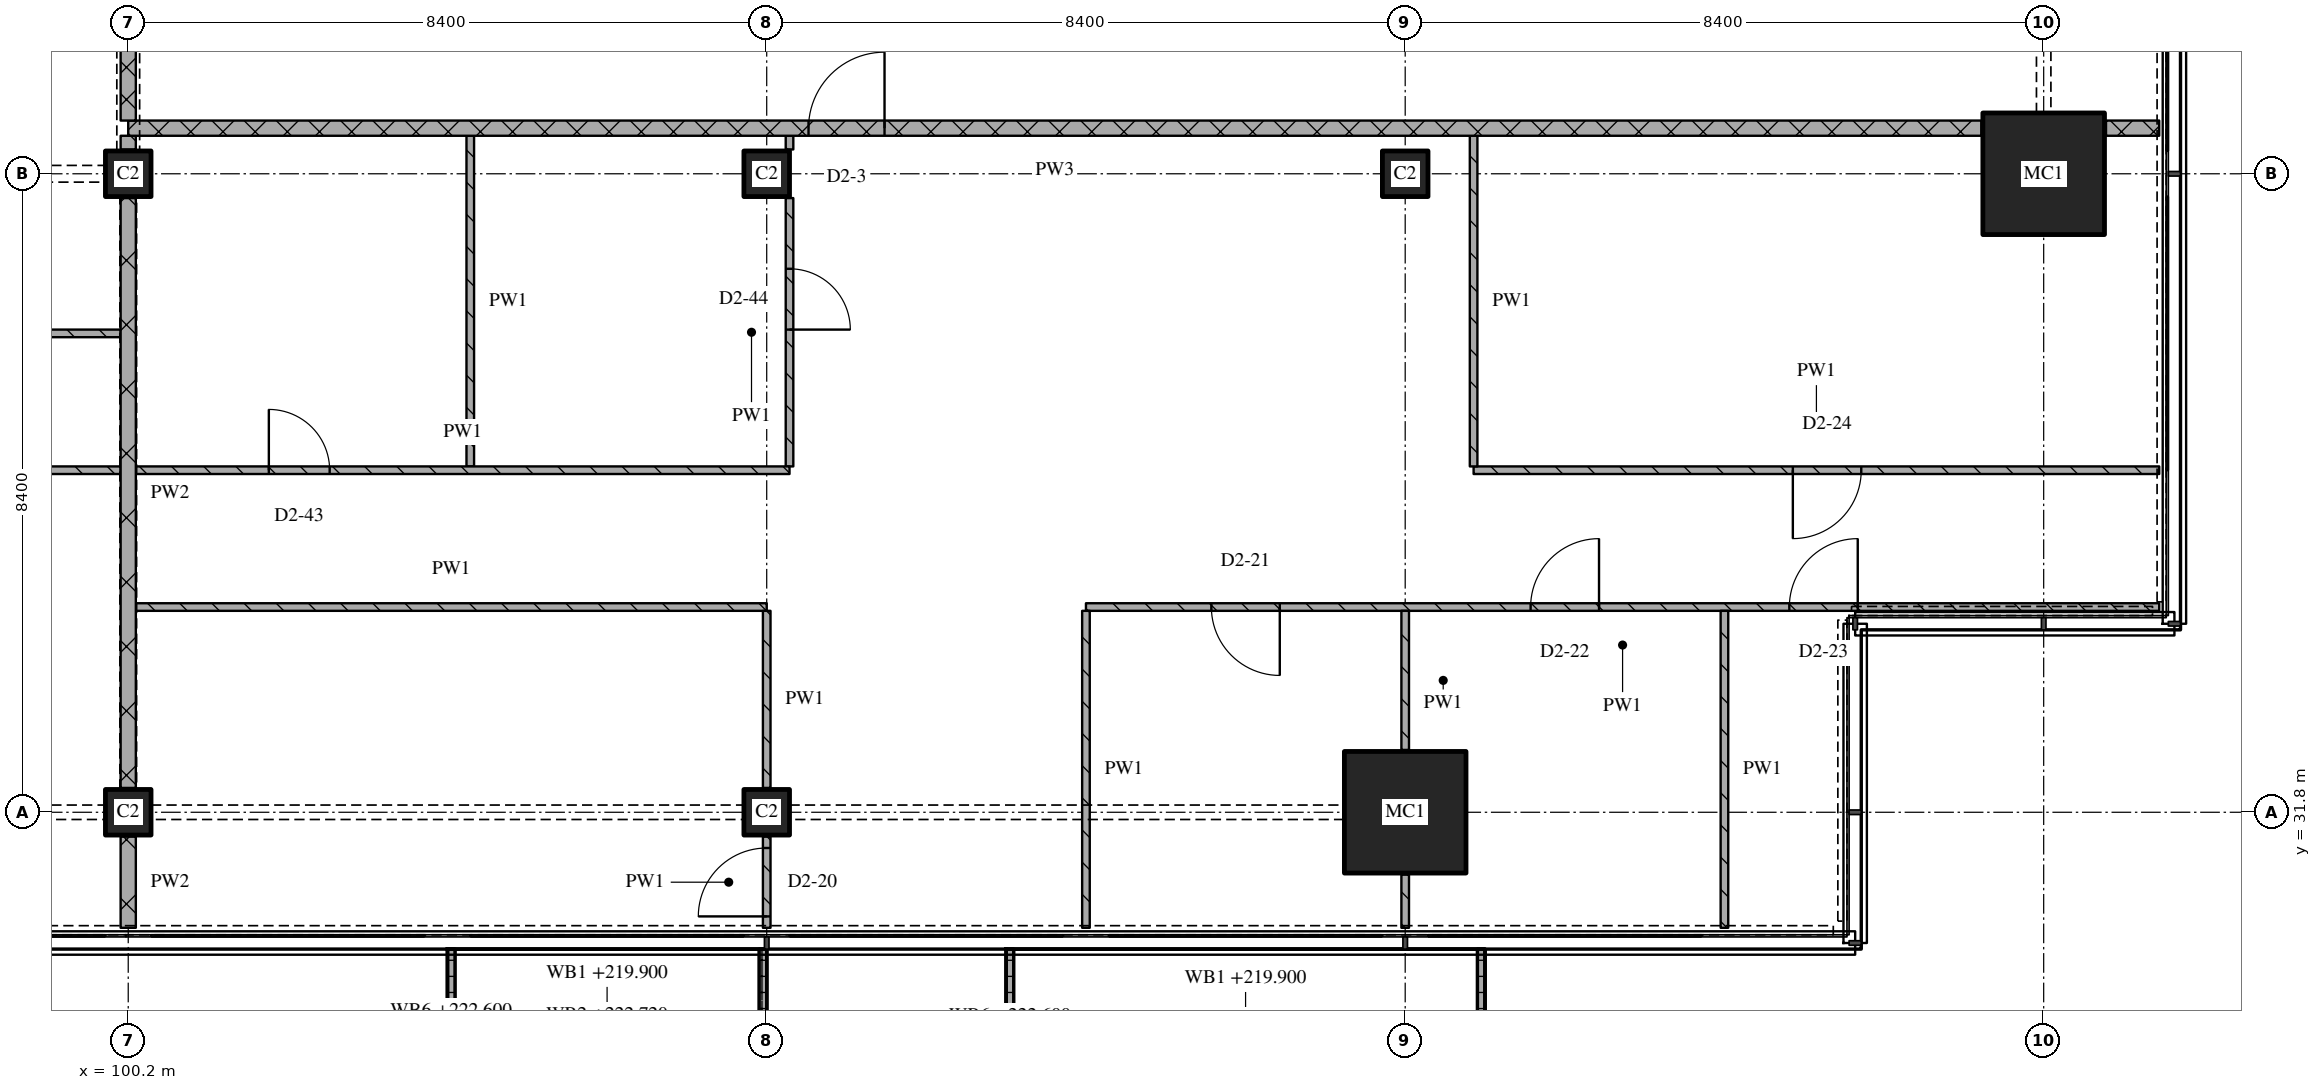
"""IFC4 building model, lengths in metres.
Left out: names, types, materials, properties, quantities, classifications, styles, units other than length and angle.
Written with IfcOpenShell. Run it as: python <this file> out.ifc"""

import sys

from ifc_helpers import new_model, si_unit, direction, frame, frame_2d, origin, origin_2d, place, context, subcontext, project, spatial, polyline, rectangle, outline, extrude, element, fill, save


model = new_model("IFC4")
c1 = context("Model", 3, precision=1e-05, world=origin(), true_north=direction((0.0, 1.0)))
c2 = subcontext(c1, "Body", "Model", "MODEL_VIEW")
j1 = project(units=[si_unit("LENGTHUNIT", "METRE"), si_unit("PLANEANGLEUNIT", "RADIAN")], contexts=[c1])
p1 = place(None, origin())
s1 = spatial("IfcSite", under=j1, at=p1, CompositionType="ELEMENT")
p2 = place(p1, origin())
s2 = spatial("IfcBuilding", under=s1, at=p2, CompositionType="ELEMENT")
p3 = place(p2, frame((0.0, 0.0, 219.9)))
s3 = spatial("IfcBuildingStorey", under=s2, at=p3, CompositionType="ELEMENT", Elevation=219.9)
for number, where, z_axis, x_axis in (
    (1, (100.2, 31.8, 0.0), (0.0, 0.0, 1.0), (1.0, 0.0, 0.0)),
    (2, (100.2, 40.2, 0.0), (0.0, 0.0, 1.0), (1.0, 0.0, 0.0)),
    (3, (108.6, 31.8, 0.0), (0.0, 0.0, 1.0), (1.0, 0.0, 0.0)),
    (4, (108.6, 40.2, 0.0), (0.0, 0.0, 1.0), (1.0, 0.0, 0.0)),
):
    element("IfcColumn", number, at=place(p3, frame(where, z_axis=z_axis, x_axis=x_axis)), inside=s3, PredefinedType="COLUMN", context=c2, shape_type="SweptSolid", body=[
        extrude(rectangle(XDim=0.6, YDim=0.6, at=origin_2d()), origin(), (0.0, 0.0, 1.0), 3.6),
    ])
p4 = place(p3, frame((117.0, 31.8, 0.0), z_axis=(0.0, 0.0, 1.0), x_axis=(1.0, 0.0, 0.0)))
e5 = element("IfcColumn", 5, at=p4, inside=s3, PredefinedType="COLUMN", context=c2, shape_type="SweptSolid", body=[
    extrude(rectangle(XDim=1.6, YDim=1.6, at=origin_2d()), origin(), (0.0, 0.0, 1.0), 3.6),
])
p5 = place(p3, frame((117.0, 40.2, 0.0), z_axis=(0.0, 0.0, 1.0), x_axis=(1.0, 0.0, 0.0)))
e6 = element("IfcColumn", 6, at=p5, inside=s3, PredefinedType="COLUMN", context=c2, shape_type="SweptSolid", body=[
    extrude(rectangle(XDim=0.6, YDim=0.6, at=origin_2d()), origin(), (0.0, 0.0, 1.0), 3.6),
])
p6 = place(p3, frame((125.4, 40.2, 0.0), z_axis=(0.0, 0.0, 1.0), x_axis=(1.0, 0.0, 0.0)))
e7 = element("IfcColumn", 7, at=p6, inside=s3, PredefinedType="COLUMN", context=c2, shape_type="SweptSolid", body=[
    extrude(rectangle(XDim=1.6, YDim=1.6, at=origin_2d()), origin(), (0.0, 0.0, 1.0), 3.6),
])
p7 = place(p3, origin())
e8 = element("IfcWall", 8, at=p7, inside=s3, PredefinedType="SOLIDWALL", context=c2, shape_type="SweptSolid", body=[
    extrude(outline(polyline([(104.4, 30.0), (104.5, 30.0), (104.5, 28.367), (108.5, 28.367), (108.5, 30.0), (108.6, 30.0), (108.6, 28.267), (104.4, 28.267), (104.4, 30.0)])), origin(), (0.0, 0.0, 1.0), 1.0),
])
p8 = place(p3, origin())
e9 = element("IfcWall", 9, at=p8, inside=s3, PredefinedType="SOLIDWALL", context=c2, shape_type="SweptSolid", body=[
    extrude(outline(polyline([(111.75, 30.0), (111.85, 30.0), (111.85, 28.233), (117.95, 28.233), (117.95, 30.0), (118.05, 30.0), (118.05, 28.133), (111.75, 28.133), (111.75, 30.0)])), origin(), (0.0, 0.0, 1.0), 1.0),
])
p9 = place(p3, frame((100.3, 34.5, 0.0), z_axis=(0.0, 0.0, 1.0), x_axis=(1.0, 0.0, 0.0)))
e10 = element("IfcWall", 10, at=p9, inside=s3, PredefinedType="PARTITIONING", context=c2, shape_type="SweptSolid", body=[
    extrude(rectangle(XDim=8.3, YDim=0.1, at=frame_2d((4.15, 0.0))), origin(), (0.0, 0.0, 1.0), 3.32),
])
p10 = place(p3, frame((126.92, 34.5, 0.0), z_axis=(0.0, 0.0, 1.0), x_axis=(-1.0, 0.0, 0.0)))
e11 = element("IfcWall", 11, at=p10, inside=s3, PredefinedType="PARTITIONING", context=c2, shape_type="SweptSolid", body=[
    extrude(rectangle(XDim=14.12, YDim=0.1, at=frame_2d((7.06, 0.0))), origin(), (0.0, 0.0, 1.0), 3.32),
])
p11 = place(p10, frame((3.966, 0.0, 0.0)))
e12 = element("IfcOpeningElement", 12, at=p11, cuts=e11, PredefinedType="OPENING", context=c2, shape_type="SweptSolid", body=[
    extrude(rectangle(XDim=0.9, YDim=2.1, at=frame_2d((0.45, 1.05))), frame((0.0, 0.06, 0.0), z_axis=(0.0, -1.0, 0.0), x_axis=(1.0, 0.0, 0.0)), (0.0, 0.0, 1.0), 0.12),
])
p12 = place(p10, frame((7.37, 0.0, 0.0)))
e13 = element("IfcOpeningElement", 13, at=p12, cuts=e11, PredefinedType="OPENING", context=c2, shape_type="SweptSolid", body=[
    extrude(rectangle(XDim=0.9, YDim=2.1, at=frame_2d((0.45, 1.05))), frame((0.0, 0.06, 0.0), z_axis=(0.0, -1.0, 0.0), x_axis=(1.0, 0.0, 0.0)), (0.0, 0.0, 1.0), 0.12),
])
p13 = place(p10, frame((11.57, 0.0, 0.0)))
e14 = element("IfcOpeningElement", 14, at=p13, cuts=e11, PredefinedType="OPENING", context=c2, shape_type="SweptSolid", body=[
    extrude(rectangle(XDim=0.9, YDim=2.1, at=frame_2d((0.45, 1.05))), frame((0.0, 0.06, 0.0), z_axis=(0.0, -1.0, 0.0), x_axis=(1.0, 0.0, 0.0)), (0.0, 0.0, 1.0), 0.12),
])
p14 = place(p3, frame((117.9, 36.3, 0.0), z_axis=(0.0, 0.0, 1.0), x_axis=(1.0, 0.0, 0.0)))
e15 = element("IfcWall", 15, at=p14, inside=s3, PredefinedType="PARTITIONING", context=c2, shape_type="SweptSolid", body=[
    extrude(rectangle(XDim=9.02, YDim=0.1, at=frame_2d((4.51, 0.0))), origin(), (0.0, 0.0, 1.0), 3.32),
])
p15 = place(p14, frame((4.2, 0.0, 0.0)))
e16 = element("IfcOpeningElement", 16, at=p15, cuts=e15, PredefinedType="OPENING", context=c2, shape_type="SweptSolid", body=[
    extrude(rectangle(XDim=0.9, YDim=2.1, at=frame_2d((0.45, 1.05))), frame((0.0, 0.06, 0.0), z_axis=(0.0, -1.0, 0.0), x_axis=(1.0, 0.0, 0.0)), (0.0, 0.0, 1.0), 0.12),
])
p16 = place(p3, frame((95.4, 38.1, 0.0), z_axis=(0.0, 0.0, 1.0), x_axis=(1.0, 0.0, 0.0)))
e17 = element("IfcWall", 17, at=p16, inside=s3, PredefinedType="PARTITIONING", context=c2, shape_type="SweptSolid", body=[
    extrude(rectangle(XDim=4.7, YDim=0.1, at=frame_2d((2.35, 0.0))), origin(), (0.0, 0.0, 1.0), 3.32),
])
p17 = place(p16, frame((1.95, 0.0, 0.0)))
e18 = element("IfcOpeningElement", 18, at=p17, cuts=e17, PredefinedType="OPENING", context=c2, shape_type="SweptSolid", body=[
    extrude(rectangle(XDim=0.9, YDim=2.1, at=frame_2d((0.45, 1.05))), frame((0.0, 0.06, 0.0), z_axis=(0.0, -1.0, 0.0), x_axis=(1.0, 0.0, 0.0)), (0.0, 0.0, 1.0), 0.12),
])
p18 = place(p3, frame((124.58, 40.8, 0.0), z_axis=(0.0, 0.0, 1.0), x_axis=(-1.0, 0.0, 0.0)))
e19 = element("IfcWall", 19, at=p18, inside=s3, PredefinedType="PARTITIONING", context=c2, shape_type="SweptSolid", body=[
    extrude(rectangle(XDim=24.38, YDim=0.2, at=frame_2d((12.19, 0.0))), origin(), (0.0, 0.0, 1.0), 3.32),
])
p19 = place(p18, frame((14.43, 0.0, 0.0)))
e20 = element("IfcOpeningElement", 20, at=p19, cuts=e19, PredefinedType="OPENING", context=c2, shape_type="SweptSolid", body=[
    extrude(rectangle(XDim=1.0, YDim=2.1, at=frame_2d((0.5, 1.05))), frame((0.0, 0.11, 0.0), z_axis=(0.0, -1.0, 0.0), x_axis=(1.0, 0.0, 0.0)), (0.0, 0.0, 1.0), 0.22),
])
p20 = place(p3, frame((126.22, 40.8, 0.0), z_axis=(0.0, 0.0, 1.0), x_axis=(1.0, 0.0, 0.0)))
e21 = element("IfcWall", 21, at=p20, inside=s3, PredefinedType="PARTITIONING", context=c2, shape_type="SweptSolid", body=[
    extrude(rectangle(XDim=0.7, YDim=0.2, at=frame_2d((0.35, 0.0))), origin(), (0.0, 0.0, 1.0), 3.32),
])
p21 = place(p3, frame((100.2, 43.1, 0.0), z_axis=(0.0, 0.0, 1.0), x_axis=(0.0, -1.0, 0.0)))
e22 = element("IfcWall", 22, at=p21, inside=s3, PredefinedType="PARTITIONING", context=c2, shape_type="SweptSolid", body=[
    extrude(rectangle(XDim=2.2, YDim=0.2, at=frame_2d((1.1, 0.0))), origin(), (0.0, 0.0, 1.0), 2.53),
])
p22 = place(p3, frame((100.2, 31.48, 0.0), z_axis=(0.0, 0.0, 1.0), x_axis=(0.0, -1.0, 0.0)))
e23 = element("IfcWall", 23, at=p22, inside=s3, PredefinedType="PARTITIONING", context=c2, shape_type="SweptSolid", body=[
    extrude(rectangle(XDim=1.2, YDim=0.2, at=frame_2d((0.6, 0.0))), origin(), (0.0, 0.0, 1.0), 3.32),
])
p23 = place(p3, frame((100.2, 39.88, 0.0), z_axis=(0.0, 0.0, 1.0), x_axis=(0.0, -1.0, 0.0)))
e24 = element("IfcWall", 24, at=p23, inside=s3, PredefinedType="PARTITIONING", context=c2, shape_type="SweptSolid", body=[
    extrude(rectangle(XDim=7.76, YDim=0.2, at=frame_2d((3.88, 0.0))), origin(), (0.0, 0.0, 1.0), 2.72),
])
p24 = place(p3, frame((100.2, 40.7, 0.0), z_axis=(0.0, 0.0, 1.0), x_axis=(0.0, -1.0, 0.0)))
e25 = element("IfcWall", 25, at=p24, inside=s3, PredefinedType="PARTITIONING", context=c2, shape_type="SweptSolid", body=[
    extrude(rectangle(XDim=0.18, YDim=0.2, at=frame_2d((0.09, 0.0))), origin(), (0.0, 0.0, 1.0), 3.32),
])
p25 = place(p3, frame((104.7, 40.7, 0.0), z_axis=(0.0, 0.0, 1.0), x_axis=(0.0, -1.0, 0.0)))
e26 = element("IfcWall", 26, at=p25, inside=s3, PredefinedType="PARTITIONING", context=c2, shape_type="SweptSolid", body=[
    extrude(rectangle(XDim=4.35, YDim=0.1, at=frame_2d((2.175, 0.0))), origin(), (0.0, 0.0, 1.0), 3.32),
])
p26 = place(p3, frame((108.6, 30.28, 0.0), z_axis=(0.0, 0.0, 1.0), x_axis=(0.0, 1.0, 0.0)))
e27 = element("IfcWall", 27, at=p26, inside=s3, PredefinedType="PARTITIONING", context=c2, shape_type="SweptSolid", body=[
    extrude(rectangle(XDim=1.2, YDim=0.1, at=frame_2d((0.6, 0.0))), origin(), (0.0, 0.0, 1.0), 3.32),
])
p27 = place(p26, frame((0.15, 0.0, 0.0)))
e28 = element("IfcOpeningElement", 28, at=p27, cuts=e27, PredefinedType="OPENING", context=c2, shape_type="SweptSolid", body=[
    extrude(rectangle(XDim=0.9, YDim=2.1, at=frame_2d((0.45, 1.05))), frame((0.0, 0.06, 0.0), z_axis=(0.0, -1.0, 0.0), x_axis=(1.0, 0.0, 0.0)), (0.0, 0.0, 1.0), 0.12),
])
p28 = place(p3, frame((108.6, 34.45, 0.0), z_axis=(0.0, 0.0, 1.0), x_axis=(0.0, -1.0, 0.0)))
e29 = element("IfcWall", 29, at=p28, inside=s3, PredefinedType="PARTITIONING", context=c2, shape_type="SweptSolid", body=[
    extrude(rectangle(XDim=2.33, YDim=0.1, at=frame_2d((1.165, 0.0))), origin(), (0.0, 0.0, 1.0), 3.32),
])
p29 = place(p3, frame((108.9, 36.35, 0.0), z_axis=(0.0, 0.0, 1.0), x_axis=(0.0, 1.0, 0.0)))
e30 = element("IfcWall", 30, at=p29, inside=s3, PredefinedType="PARTITIONING", context=c2, shape_type="SweptSolid", body=[
    extrude(rectangle(XDim=3.53, YDim=0.1, at=frame_2d((1.765, 0.0))), origin(), (0.0, 0.0, 1.0), 3.32),
])
p30 = place(p29, frame((1.8, 0.0, 0.0)))
e31 = element("IfcOpeningElement", 31, at=p30, cuts=e30, PredefinedType="OPENING", context=c2, shape_type="SweptSolid", body=[
    extrude(rectangle(XDim=0.8, YDim=2.1, at=frame_2d((0.4, 1.05))), frame((0.0, 0.06, 0.0), z_axis=(0.0, -1.0, 0.0), x_axis=(1.0, 0.0, 0.0)), (0.0, 0.0, 1.0), 0.12),
])
p31 = place(p3, frame((108.9, 40.7, 0.0), z_axis=(0.0, 0.0, 1.0), x_axis=(0.0, -1.0, 0.0)))
e32 = element("IfcWall", 32, at=p31, inside=s3, PredefinedType="PARTITIONING", context=c2, shape_type="SweptSolid", body=[
    extrude(rectangle(XDim=0.18, YDim=0.1, at=frame_2d((0.09, 0.0))), origin(), (0.0, 0.0, 1.0), 3.32),
])
p32 = place(p3, frame((112.8, 34.45, 0.0), z_axis=(0.0, 0.0, 1.0), x_axis=(0.0, -1.0, 0.0)))
e33 = element("IfcWall", 33, at=p32, inside=s3, PredefinedType="PARTITIONING", context=c2, shape_type="SweptSolid", body=[
    extrude(rectangle(XDim=4.17, YDim=0.1, at=frame_2d((2.085, 0.0))), origin(), (0.0, 0.0, 1.0), 3.32),
])
p33 = place(p3, frame((117.0, 30.98, 0.0), z_axis=(0.0, 0.0, 1.0), x_axis=(0.0, -1.0, 0.0)))
e34 = element("IfcWall", 34, at=p33, inside=s3, PredefinedType="PARTITIONING", context=c2, shape_type="SweptSolid", body=[
    extrude(rectangle(XDim=0.7, YDim=0.1, at=frame_2d((0.35, 0.0))), origin(), (0.0, 0.0, 1.0), 3.32),
])
p34 = place(p3, frame((117.0, 34.45, 0.0), z_axis=(0.0, 0.0, 1.0), x_axis=(0.0, -1.0, 0.0)))
e35 = element("IfcWall", 35, at=p34, inside=s3, PredefinedType="PARTITIONING", context=c2, shape_type="SweptSolid", body=[
    extrude(rectangle(XDim=1.83, YDim=0.1, at=frame_2d((0.915, 0.0))), origin(), (0.0, 0.0, 1.0), 3.32),
])
p35 = place(p3, frame((117.9, 40.7, 0.0), z_axis=(0.0, 0.0, 1.0), x_axis=(0.0, -1.0, 0.0)))
e36 = element("IfcWall", 36, at=p35, inside=s3, PredefinedType="PARTITIONING", context=c2, shape_type="SweptSolid", body=[
    extrude(rectangle(XDim=4.35, YDim=0.1, at=frame_2d((2.175, 0.0))), origin(), (0.0, 0.0, 1.0), 3.32),
])
p36 = place(p3, frame((121.2, 34.45, 0.0), z_axis=(0.0, 0.0, 1.0), x_axis=(0.0, -1.0, 0.0)))
e37 = element("IfcWall", 37, at=p36, inside=s3, PredefinedType="PARTITIONING", context=c2, shape_type="SweptSolid", body=[
    extrude(rectangle(XDim=4.17, YDim=0.1, at=frame_2d((2.085, 0.0))), origin(), (0.0, 0.0, 1.0), 3.32),
])
p37 = place(p3, frame((100.1, 36.3, 0.0), z_axis=(0.0, 0.0, 1.0), x_axis=(-1.0, 0.0, 0.0)))
e38 = element("IfcWall", 38, at=p37, inside=s3, PredefinedType="PARTITIONING", context=c2, shape_type="SweptSolid", body=[
    extrude(rectangle(XDim=20.9, YDim=0.1, at=frame_2d((10.45, 0.0))), origin(), (0.0, 0.0, 1.0), 3.32),
])
p38 = place(p37, frame((1.55, 0.0, 0.0)))
e39 = element("IfcOpeningElement", 39, at=p38, cuts=e38, PredefinedType="OPENING", context=c2, shape_type="SweptSolid", body=[
    extrude(rectangle(XDim=0.9, YDim=2.1, at=frame_2d((0.45, 1.05))), frame((0.0, 0.06, 0.0), z_axis=(0.0, -1.0, 0.0), x_axis=(1.0, 0.0, 0.0)), (0.0, 0.0, 1.0), 0.12),
])
p39 = place(p37, frame((7.85, 0.0, 0.0)))
e40 = element("IfcOpeningElement", 40, at=p39, cuts=e38, PredefinedType="OPENING", context=c2, shape_type="SweptSolid", body=[
    extrude(rectangle(XDim=0.9, YDim=2.1, at=frame_2d((0.45, 1.05))), frame((0.0, 0.06, 0.0), z_axis=(0.0, -1.0, 0.0), x_axis=(1.0, 0.0, 0.0)), (0.0, 0.0, 1.0), 0.12),
])
p40 = place(p37, frame((16.25, 0.0, 0.0)))
e41 = element("IfcOpeningElement", 41, at=p40, cuts=e38, PredefinedType="OPENING", context=c2, shape_type="SweptSolid", body=[
    extrude(rectangle(XDim=0.9, YDim=2.1, at=frame_2d((0.45, 1.05))), frame((0.0, 0.06, 0.0), z_axis=(0.0, -1.0, 0.0), x_axis=(1.0, 0.0, 0.0)), (0.0, 0.0, 1.0), 0.12),
])
p41 = place(p3, frame((100.3, 36.3, 0.0), z_axis=(0.0, 0.0, 1.0), x_axis=(1.0, 0.0, 0.0)))
e42 = element("IfcWall", 42, at=p41, inside=s3, PredefinedType="PARTITIONING", context=c2, shape_type="SweptSolid", body=[
    extrude(rectangle(XDim=8.6, YDim=0.1, at=frame_2d((4.3, 0.0))), origin(), (0.0, 0.0, 1.0), 3.32),
])
p42 = place(p41, frame((1.75, 0.0, 0.0)))
e43 = element("IfcOpeningElement", 43, at=p42, cuts=e42, PredefinedType="OPENING", context=c2, shape_type="SweptSolid", body=[
    extrude(rectangle(XDim=0.8, YDim=2.1, at=frame_2d((0.4, 1.05))), frame((0.0, 0.06, 0.0), z_axis=(0.0, -1.0, 0.0), x_axis=(1.0, 0.0, 0.0)), (0.0, 0.0, 1.0), 0.12),
])
p43 = place(p11, origin())
e44 = element("IfcDoor", 44, at=p43, inside=s3, OperationType="SINGLE_SWING_RIGHT", PredefinedType="DOOR", context=c2, shape_type="SweptSolid", body=[
    extrude(rectangle(XDim=0.9, YDim=2.1, at=frame_2d((0.45, 1.05))), frame((0.0, 0.025, 0.0), z_axis=(0.0, -1.0, 0.0), x_axis=(1.0, 0.0, 0.0)), (0.0, 0.0, 1.0), 0.05),
])
fill(e12, e44)
p44 = place(p12, origin())
e45 = element("IfcDoor", 45, at=p44, inside=s3, OperationType="SINGLE_SWING_RIGHT", PredefinedType="DOOR", context=c2, shape_type="SweptSolid", body=[
    extrude(rectangle(XDim=0.9, YDim=2.1, at=frame_2d((0.45, 1.05))), frame((0.0, 0.025, 0.0), z_axis=(0.0, -1.0, 0.0), x_axis=(1.0, 0.0, 0.0)), (0.0, 0.0, 1.0), 0.05),
])
fill(e13, e45)
p45 = place(p13, origin())
e46 = element("IfcDoor", 46, at=p45, inside=s3, OperationType="SINGLE_SWING_LEFT", PredefinedType="DOOR", context=c2, shape_type="SweptSolid", body=[
    extrude(rectangle(XDim=0.9, YDim=2.1, at=frame_2d((0.45, 1.05))), frame((0.0, 0.025, 0.0), z_axis=(0.0, -1.0, 0.0), x_axis=(1.0, 0.0, 0.0)), (0.0, 0.0, 1.0), 0.05),
])
fill(e14, e46)
p46 = place(p15, origin())
e47 = element("IfcDoor", 47, at=p46, inside=s3, OperationType="SINGLE_SWING_RIGHT", PredefinedType="DOOR", context=c2, shape_type="SweptSolid", body=[
    extrude(rectangle(XDim=0.9, YDim=2.1, at=frame_2d((0.45, 1.05))), frame((0.0, 0.025, 0.0), z_axis=(0.0, -1.0, 0.0), x_axis=(1.0, 0.0, 0.0)), (0.0, 0.0, 1.0), 0.05),
])
fill(e16, e47)
p47 = place(p19, origin())
e48 = element("IfcDoor", 48, at=p47, inside=s3, OperationType="SINGLE_SWING_RIGHT", PredefinedType="DOOR", context=c2, shape_type="SweptSolid", body=[
    extrude(rectangle(XDim=1.0, YDim=2.1, at=frame_2d((0.5, 1.05))), frame((0.0, 0.025, 0.0), z_axis=(0.0, -1.0, 0.0), x_axis=(1.0, 0.0, 0.0)), (0.0, 0.0, 1.0), 0.05),
])
fill(e20, e48)
p48 = place(p27, origin())
e49 = element("IfcDoor", 49, at=p48, inside=s3, OperationType="SINGLE_SWING_LEFT", PredefinedType="DOOR", context=c2, shape_type="SweptSolid", body=[
    extrude(rectangle(XDim=0.9, YDim=2.1, at=frame_2d((0.45, 1.05))), frame((0.0, 0.025, 0.0), z_axis=(0.0, -1.0, 0.0), x_axis=(1.0, 0.0, 0.0)), (0.0, 0.0, 1.0), 0.05),
])
fill(e28, e49)
p49 = place(p30, origin())
e50 = element("IfcDoor", 50, at=p49, inside=s3, OperationType="SINGLE_SWING_RIGHT", PredefinedType="DOOR", context=c2, shape_type="SweptSolid", body=[
    extrude(rectangle(XDim=0.8, YDim=2.1, at=frame_2d((0.4, 1.05))), frame((0.0, 0.025, 0.0), z_axis=(0.0, -1.0, 0.0), x_axis=(1.0, 0.0, 0.0)), (0.0, 0.0, 1.0), 0.05),
])
fill(e31, e50)
p50 = place(p42, origin())
e51 = element("IfcDoor", 51, at=p50, inside=s3, OperationType="SINGLE_SWING_LEFT", PredefinedType="DOOR", context=c2, shape_type="SweptSolid", body=[
    extrude(rectangle(XDim=0.8, YDim=2.1, at=frame_2d((0.4, 1.05))), frame((0.0, 0.025, 0.0), z_axis=(0.0, -1.0, 0.0), x_axis=(1.0, 0.0, 0.0)), (0.0, 0.0, 1.0), 0.05),
])
fill(e43, e51)
save(model, sys.argv[1])
